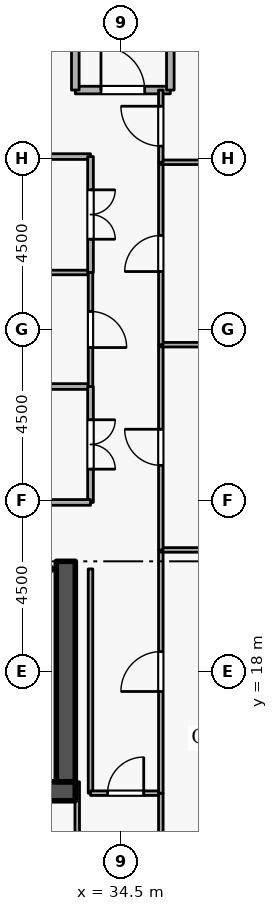
"""IFC4 building model, lengths in metres.
Left out: names, types, materials, properties, quantities, classifications, styles, units other than length and angle.
Written with IfcOpenShell. Run it as: python <this file> out.ifc"""

import sys

from ifc_helpers import new_model, si_unit, direction, frame, frame_2d, origin, place, context, subcontext, project, spatial, rectangle, extrude, element, fill, save


model = new_model("IFC4")
c1 = context("Model", 3, precision=1e-05, world=origin(), true_north=direction((0.0, 1.0)))
c2 = subcontext(c1, "Body", "Model", "MODEL_VIEW")
j1 = project(units=[si_unit("LENGTHUNIT", "METRE"), si_unit("PLANEANGLEUNIT", "RADIAN")], contexts=[c1])
p1 = place(None, origin())
s1 = spatial("IfcSite", under=j1, at=p1, CompositionType="ELEMENT")
p2 = place(p1, origin())
s2 = spatial("IfcBuilding", under=s1, at=p2, CompositionType="ELEMENT")
p3 = place(p2, frame((0.0, 0.0, 272.7)))
s3 = spatial("IfcBuildingStorey", under=s2, at=p3, CompositionType="ELEMENT", Elevation=272.7)
p4 = place(p3, frame((17.7, 14.85, 0.0), z_axis=(0.0, 0.0, 1.0), x_axis=(1.0, 0.0, 0.0)))
e1 = element("IfcWall", 1, at=p4, inside=s3, PredefinedType="SHEAR", context=c2, shape_type="SweptSolid", body=[
    extrude(rectangle(XDim=15.6, YDim=0.5, at=frame_2d((7.8, 0.0))), origin(), (0.0, 0.0, 1.0), 3.6),
])
p5 = place(p3, frame((33.05, 15.1, 0.0), z_axis=(0.0, 0.0, 1.0), x_axis=(0.0, 1.0, 0.0)))
e2 = element("IfcWall", 2, at=p5, inside=s3, PredefinedType="SHEAR", context=c2, shape_type="SweptSolid", body=[
    extrude(rectangle(XDim=5.8, YDim=0.5, at=frame_2d((2.9, 0.0))), origin(), (0.0, 0.0, 1.0), 3.6),
])
p6 = place(p3, frame((33.3, 33.3, 0.0), z_axis=(0.0, 0.0, 1.0), x_axis=(1.0, 0.0, 0.0)))
e3 = element("IfcWall", 3, at=p6, inside=s3, PredefinedType="STANDARD", context=c2, shape_type="SweptSolid", body=[
    extrude(rectangle(XDim=2.5, YDim=0.2, at=frame_2d((1.25, 0.0))), origin(), (0.0, 0.0, 1.0), 3.34),
])
p7 = place(p6, frame((0.675, 0.0, 0.0)))
e4 = element("IfcOpeningElement", 4, at=p7, cuts=e3, PredefinedType="OPENING", context=c2, shape_type="SweptSolid", body=[
    extrude(rectangle(XDim=1.15, YDim=2.1, at=frame_2d((0.575, 1.05))), frame((0.0, 0.11, 0.0), z_axis=(0.0, -1.0, 0.0), x_axis=(1.0, 0.0, 0.0)), (0.0, 0.0, 1.0), 0.22),
])
p8 = place(p3, frame((35.8, 33.3, 0.0), z_axis=(0.0, 0.0, 1.0), x_axis=(0.0, 1.0, 0.0)))
e5 = element("IfcWall", 5, at=p8, inside=s3, PredefinedType="STANDARD", context=c2, shape_type="SweptSolid", body=[
    extrude(rectangle(XDim=5.7, YDim=0.2, at=frame_2d((2.85, 0.0))), origin(), (0.0, 0.0, 1.0), 3.34),
])
p9 = place(p3, frame((33.3, 35.6, 0.0), z_axis=(0.0, 0.0, 1.0), x_axis=(0.0, -1.0, 0.0)))
e6 = element("IfcWall", 6, at=p9, inside=s3, PredefinedType="STANDARD", context=c2, shape_type="SweptSolid", body=[
    extrude(rectangle(XDim=2.3, YDim=0.2, at=frame_2d((1.15, 0.0))), origin(), (0.0, 0.0, 1.0), 2.545),
])
p10 = place(p3, frame((33.7, 20.7, 0.0), z_axis=(0.0, 0.0, 1.0), x_axis=(0.0, -1.0, 0.0)))
e7 = element("IfcWall", 7, at=p10, inside=s3, PredefinedType="PARTITIONING", context=c2, shape_type="SweptSolid", body=[
    extrude(rectangle(XDim=5.9, YDim=0.12, at=frame_2d((2.95, 0.0))), origin(), (0.0, 0.0, 1.0), 3.34),
])
p11 = place(p3, frame((33.7, 14.8, 0.0), z_axis=(0.0, 0.0, 1.0), x_axis=(1.0, 0.0, 0.0)))
e8 = element("IfcWall", 8, at=p11, inside=s3, PredefinedType="PARTITIONING", context=c2, shape_type="SweptSolid", body=[
    extrude(rectangle(XDim=1.85, YDim=0.12, at=frame_2d((0.925, 0.0))), origin(), (0.0, 0.0, 1.0), 3.34),
])
p12 = place(p11, frame((0.45, 0.0, 0.0)))
e9 = element("IfcOpeningElement", 9, at=p12, cuts=e8, PredefinedType="OPENING", context=c2, shape_type="SweptSolid", body=[
    extrude(rectangle(XDim=0.95, YDim=2.1, at=frame_2d((0.475, 1.05))), frame((0.0, 0.07, 0.0), z_axis=(0.0, -1.0, 0.0), x_axis=(1.0, 0.0, 0.0)), (0.0, 0.0, 1.0), 0.14),
])
p13 = place(p3, frame((35.55, 14.8, 0.0), z_axis=(0.0, 0.0, 1.0), x_axis=(0.0, -1.0, 0.0)))
e10 = element("IfcWall", 10, at=p13, inside=s3, PredefinedType="PARTITIONING", context=c2, shape_type="SweptSolid", body=[
    extrude(rectangle(XDim=11.52, YDim=0.12, at=frame_2d((5.76, 0.0))), origin(), (0.0, 0.0, 1.0), 3.34),
])
p14 = place(p3, frame((33.35, 3.28, 0.0), z_axis=(0.0, 0.0, 1.0), x_axis=(0.0, 1.0, 0.0)))
e11 = element("IfcWall", 11, at=p14, inside=s3, PredefinedType="PARTITIONING", context=c2, shape_type="SweptSolid", body=[
    extrude(rectangle(XDim=11.82, YDim=0.12, at=frame_2d((5.91, 0.0))), origin(), (0.0, 0.0, 1.0), 2.545),
])
p15 = place(p3, frame((35.55, 14.8, 0.0), z_axis=(0.0, 0.0, 1.0), x_axis=(0.0, 1.0, 0.0)))
e12 = element("IfcWall", 12, at=p15, inside=s3, PredefinedType="PARTITIONING", context=c2, shape_type="SweptSolid", body=[
    extrude(rectangle(XDim=6.4, YDim=0.12, at=frame_2d((3.2, 0.0))), origin(), (0.0, 0.0, 1.0), 3.34),
])
p16 = place(p15, frame((2.675, 0.0, 0.0)))
e13 = element("IfcOpeningElement", 13, at=p16, cuts=e12, PredefinedType="OPENING", context=c2, shape_type="SweptSolid", body=[
    extrude(rectangle(XDim=1.05, YDim=2.1, at=frame_2d((0.525, 1.05))), frame((0.0, 0.07, 0.0), z_axis=(0.0, -1.0, 0.0), x_axis=(1.0, 0.0, 0.0)), (0.0, 0.0, 1.0), 0.14),
])
p17 = place(p3, frame((35.55, 21.2, 0.0), z_axis=(0.0, 0.0, 1.0), x_axis=(1.0, 0.0, 0.0)))
e14 = element("IfcWall", 14, at=p17, inside=s3, PredefinedType="PARTITIONING", context=c2, shape_type="SweptSolid", body=[
    extrude(rectangle(XDim=13.67, YDim=0.12, at=frame_2d((6.835, 0.0))), origin(), (0.0, 0.0, 1.0), 3.34),
])
p18 = place(p3, frame((35.55, 21.2, 0.0), z_axis=(0.0, 0.0, 1.0), x_axis=(0.0, 1.0, 0.0)))
e15 = element("IfcWall", 15, at=p18, inside=s3, PredefinedType="PARTITIONING", context=c2, shape_type="SweptSolid", body=[
    extrude(rectangle(XDim=5.4, YDim=0.12, at=frame_2d((2.7, 0.0))), origin(), (0.0, 0.0, 1.0), 3.34),
])
p19 = place(p18, frame((2.225, 0.0, 0.0)))
e16 = element("IfcOpeningElement", 16, at=p19, cuts=e15, PredefinedType="OPENING", context=c2, shape_type="SweptSolid", body=[
    extrude(rectangle(XDim=0.95, YDim=2.1, at=frame_2d((0.475, 1.05))), frame((0.0, 0.07, 0.0), z_axis=(0.0, -1.0, 0.0), x_axis=(1.0, 0.0, 0.0)), (0.0, 0.0, 1.0), 0.14),
])
p20 = place(p3, frame((35.55, 26.6, 0.0), z_axis=(0.0, 0.0, 1.0), x_axis=(1.0, 0.0, 0.0)))
e17 = element("IfcWall", 17, at=p20, inside=s3, PredefinedType="PARTITIONING", context=c2, shape_type="SweptSolid", body=[
    extrude(rectangle(XDim=13.67, YDim=0.12, at=frame_2d((6.835, 0.0))), origin(), (0.0, 0.0, 1.0), 3.34),
])
p21 = place(p3, frame((35.55, 26.6, 0.0), z_axis=(0.0, 0.0, 1.0), x_axis=(0.0, 1.0, 0.0)))
e18 = element("IfcWall", 18, at=p21, inside=s3, PredefinedType="PARTITIONING", context=c2, shape_type="SweptSolid", body=[
    extrude(rectangle(XDim=4.8, YDim=0.12, at=frame_2d((2.4, 0.0))), origin(), (0.0, 0.0, 1.0), 3.34),
])
p22 = place(p21, frame((1.925, 0.0, 0.0)))
e19 = element("IfcOpeningElement", 19, at=p22, cuts=e18, PredefinedType="OPENING", context=c2, shape_type="SweptSolid", body=[
    extrude(rectangle(XDim=0.95, YDim=2.1, at=frame_2d((0.475, 1.05))), frame((0.0, 0.07, 0.0), z_axis=(0.0, -1.0, 0.0), x_axis=(1.0, 0.0, 0.0)), (0.0, 0.0, 1.0), 0.14),
])
p23 = place(p3, frame((35.55, 31.4, 0.0), z_axis=(0.0, 0.0, 1.0), x_axis=(1.0, 0.0, 0.0)))
e20 = element("IfcWall", 20, at=p23, inside=s3, PredefinedType="PARTITIONING", context=c2, shape_type="SweptSolid", body=[
    extrude(rectangle(XDim=13.67, YDim=0.12, at=frame_2d((6.835, 0.0))), origin(), (0.0, 0.0, 1.0), 3.34),
])
p24 = place(p3, frame((35.55, 31.4, 0.0), z_axis=(0.0, 0.0, 1.0), x_axis=(0.0, 1.0, 0.0)))
e21 = element("IfcWall", 21, at=p24, inside=s3, PredefinedType="PARTITIONING", context=c2, shape_type="SweptSolid", body=[
    extrude(rectangle(XDim=1.9, YDim=0.12, at=frame_2d((0.95, 0.0))), origin(), (0.0, 0.0, 1.0), 3.34),
])
p25 = place(p24, frame((0.425, 0.0, 0.0)))
e22 = element("IfcOpeningElement", 22, at=p25, cuts=e21, PredefinedType="OPENING", context=c2, shape_type="SweptSolid", body=[
    extrude(rectangle(XDim=1.05, YDim=2.1, at=frame_2d((0.525, 1.05))), frame((0.0, 0.07, 0.0), z_axis=(0.0, -1.0, 0.0), x_axis=(1.0, 0.0, 0.0)), (0.0, 0.0, 1.0), 0.14),
])
p26 = place(p3, frame((30.7, 25.5, 0.0), z_axis=(0.0, 0.0, 1.0), x_axis=(1.0, 0.0, 0.0)))
e23 = element("IfcWall", 23, at=p26, inside=s3, PredefinedType="PARTITIONING", context=c2, shape_type="SweptSolid", body=[
    extrude(rectangle(XDim=3.0, YDim=0.15, at=frame_2d((1.5, 0.0))), origin(), (0.0, 0.0, 1.0), 3.34),
])
p27 = place(p3, frame((33.7, 25.5, 0.0), z_axis=(0.0, 0.0, 1.0), x_axis=(0.0, -1.0, 0.0)))
e24 = element("IfcWall", 24, at=p27, inside=s3, PredefinedType="PARTITIONING", context=c2, shape_type="SweptSolid", body=[
    extrude(rectangle(XDim=3.05, YDim=0.15, at=frame_2d((1.525, 0.0))), origin(), (0.0, 0.0, 1.0), 3.34),
])
p28 = place(p27, frame((0.875, 0.0, 0.0)))
e25 = element("IfcOpeningElement", 25, at=p28, cuts=e24, PredefinedType="OPENING", context=c2, shape_type="SweptSolid", body=[
    extrude(rectangle(XDim=1.3, YDim=2.12, at=frame_2d((0.65, 1.06))), frame((0.0, 0.085, 0.0), z_axis=(0.0, -1.0, 0.0), x_axis=(1.0, 0.0, 0.0)), (0.0, 0.0, 1.0), 0.17),
])
p29 = place(p3, frame((33.7, 22.45, 0.0), z_axis=(0.0, 0.0, 1.0), x_axis=(-1.0, 0.0, 0.0)))
e26 = element("IfcWall", 26, at=p29, inside=s3, PredefinedType="PARTITIONING", context=c2, shape_type="SweptSolid", body=[
    extrude(rectangle(XDim=3.0, YDim=0.15, at=frame_2d((1.5, 0.0))), origin(), (0.0, 0.0, 1.0), 3.34),
])
p30 = place(p3, frame((30.7, 28.5, 0.0), z_axis=(0.0, 0.0, 1.0), x_axis=(1.0, 0.0, 0.0)))
e27 = element("IfcWall", 27, at=p30, inside=s3, PredefinedType="PARTITIONING", context=c2, shape_type="SweptSolid", body=[
    extrude(rectangle(XDim=3.0, YDim=0.12, at=frame_2d((1.5, 0.0))), origin(), (0.0, 0.0, 1.0), 3.34),
])
p31 = place(p3, frame((33.7, 28.5, 0.0), z_axis=(0.0, 0.0, 1.0), x_axis=(0.0, -1.0, 0.0)))
e28 = element("IfcWall", 28, at=p31, inside=s3, PredefinedType="PARTITIONING", context=c2, shape_type="SweptSolid", body=[
    extrude(rectangle(XDim=3.0, YDim=0.12, at=frame_2d((1.5, 0.0))), origin(), (0.0, 0.0, 1.0), 3.34),
])
p32 = place(p31, frame((1.025, 0.0, 0.0)))
e29 = element("IfcOpeningElement", 29, at=p32, cuts=e28, PredefinedType="OPENING", context=c2, shape_type="SweptSolid", body=[
    extrude(rectangle(XDim=0.95, YDim=2.1, at=frame_2d((0.475, 1.05))), frame((0.0, 0.07, 0.0), z_axis=(0.0, -1.0, 0.0), x_axis=(1.0, 0.0, 0.0)), (0.0, 0.0, 1.0), 0.14),
])
p33 = place(p3, frame((30.7, 31.55, 0.0), z_axis=(0.0, 0.0, 1.0), x_axis=(1.0, 0.0, 0.0)))
e30 = element("IfcWall", 30, at=p33, inside=s3, PredefinedType="PARTITIONING", context=c2, shape_type="SweptSolid", body=[
    extrude(rectangle(XDim=3.0, YDim=0.15, at=frame_2d((1.5, 0.0))), origin(), (0.0, 0.0, 1.0), 3.34),
])
p34 = place(p3, frame((33.7, 31.55, 0.0), z_axis=(0.0, 0.0, 1.0), x_axis=(0.0, -1.0, 0.0)))
e31 = element("IfcWall", 31, at=p34, inside=s3, PredefinedType="PARTITIONING", context=c2, shape_type="SweptSolid", body=[
    extrude(rectangle(XDim=3.05, YDim=0.15, at=frame_2d((1.525, 0.0))), origin(), (0.0, 0.0, 1.0), 3.34),
])
p35 = place(p34, frame((0.875, 0.0, 0.0)))
e32 = element("IfcOpeningElement", 32, at=p35, cuts=e31, PredefinedType="OPENING", context=c2, shape_type="SweptSolid", body=[
    extrude(rectangle(XDim=1.3, YDim=2.12, at=frame_2d((0.65, 1.06))), frame((0.0, 0.085, 0.0), z_axis=(0.0, -1.0, 0.0), x_axis=(1.0, 0.0, 0.0)), (0.0, 0.0, 1.0), 0.17),
])
p36 = place(p7, origin())
e33 = element("IfcDoor", 33, at=p36, inside=s3, OperationType="SINGLE_SWING_LEFT", PredefinedType="DOOR", context=c2, shape_type="SweptSolid", body=[
    extrude(rectangle(XDim=1.15, YDim=2.1, at=frame_2d((0.575, 1.05))), frame((0.0, 0.025, 0.0), z_axis=(0.0, -1.0, 0.0), x_axis=(1.0, 0.0, 0.0)), (0.0, 0.0, 1.0), 0.05),
])
fill(e4, e33)
p37 = place(p12, origin())
e34 = element("IfcDoor", 34, at=p37, inside=s3, OperationType="SINGLE_SWING_RIGHT", PredefinedType="DOOR", context=c2, shape_type="SweptSolid", body=[
    extrude(rectangle(XDim=0.95, YDim=2.1, at=frame_2d((0.475, 1.05))), frame((0.0, 0.025, 0.0), z_axis=(0.0, -1.0, 0.0), x_axis=(1.0, 0.0, 0.0)), (0.0, 0.0, 1.0), 0.05),
])
fill(e9, e34)
p38 = place(p16, origin())
e35 = element("IfcDoor", 35, at=p38, inside=s3, OperationType="SINGLE_SWING_LEFT", PredefinedType="DOOR", context=c2, shape_type="SweptSolid", body=[
    extrude(rectangle(XDim=1.05, YDim=2.1, at=frame_2d((0.525, 1.05))), frame((0.0, 0.025, 0.0), z_axis=(0.0, -1.0, 0.0), x_axis=(1.0, 0.0, 0.0)), (0.0, 0.0, 1.0), 0.05),
])
fill(e13, e35)
p39 = place(p19, origin())
e36 = element("IfcDoor", 36, at=p39, inside=s3, OperationType="SINGLE_SWING_RIGHT", PredefinedType="DOOR", context=c2, shape_type="SweptSolid", body=[
    extrude(rectangle(XDim=0.95, YDim=2.1, at=frame_2d((0.475, 1.05))), frame((0.0, 0.025, 0.0), z_axis=(0.0, -1.0, 0.0), x_axis=(1.0, 0.0, 0.0)), (0.0, 0.0, 1.0), 0.05),
])
fill(e16, e36)
p40 = place(p22, origin())
e37 = element("IfcDoor", 37, at=p40, inside=s3, OperationType="SINGLE_SWING_LEFT", PredefinedType="DOOR", context=c2, shape_type="SweptSolid", body=[
    extrude(rectangle(XDim=0.95, YDim=2.1, at=frame_2d((0.475, 1.05))), frame((0.0, 0.025, 0.0), z_axis=(0.0, -1.0, 0.0), x_axis=(1.0, 0.0, 0.0)), (0.0, 0.0, 1.0), 0.05),
])
fill(e19, e37)
p41 = place(p25, origin())
e38 = element("IfcDoor", 38, at=p41, inside=s3, OperationType="SINGLE_SWING_RIGHT", PredefinedType="DOOR", context=c2, shape_type="SweptSolid", body=[
    extrude(rectangle(XDim=1.05, YDim=2.1, at=frame_2d((0.525, 1.05))), frame((0.0, 0.025, 0.0), z_axis=(0.0, -1.0, 0.0), x_axis=(1.0, 0.0, 0.0)), (0.0, 0.0, 1.0), 0.05),
])
fill(e22, e38)
p42 = place(p28, origin())
e39 = element("IfcDoor", 39, at=p42, inside=s3, OperationType="DOUBLE_DOOR_SINGLE_SWING", PredefinedType="DOOR", context=c2, shape_type="SweptSolid", body=[
    extrude(rectangle(XDim=1.3, YDim=2.12, at=frame_2d((0.65, 1.06))), frame((0.0, 0.025, 0.0), z_axis=(0.0, -1.0, 0.0), x_axis=(1.0, 0.0, 0.0)), (0.0, 0.0, 1.0), 0.05),
])
fill(e25, e39)
p43 = place(p32, origin())
e40 = element("IfcDoor", 40, at=p43, inside=s3, OperationType="SINGLE_SWING_RIGHT", PredefinedType="DOOR", context=c2, shape_type="SweptSolid", body=[
    extrude(rectangle(XDim=0.95, YDim=2.1, at=frame_2d((0.475, 1.05))), frame((0.0, 0.025, 0.0), z_axis=(0.0, -1.0, 0.0), x_axis=(1.0, 0.0, 0.0)), (0.0, 0.0, 1.0), 0.05),
])
fill(e29, e40)
p44 = place(p35, origin())
e41 = element("IfcDoor", 41, at=p44, inside=s3, OperationType="DOUBLE_DOOR_SINGLE_SWING", PredefinedType="DOOR", context=c2, shape_type="SweptSolid", body=[
    extrude(rectangle(XDim=1.3, YDim=2.12, at=frame_2d((0.65, 1.06))), frame((0.0, 0.025, 0.0), z_axis=(0.0, -1.0, 0.0), x_axis=(1.0, 0.0, 0.0)), (0.0, 0.0, 1.0), 0.05),
])
fill(e32, e41)
save(model, sys.argv[1])
